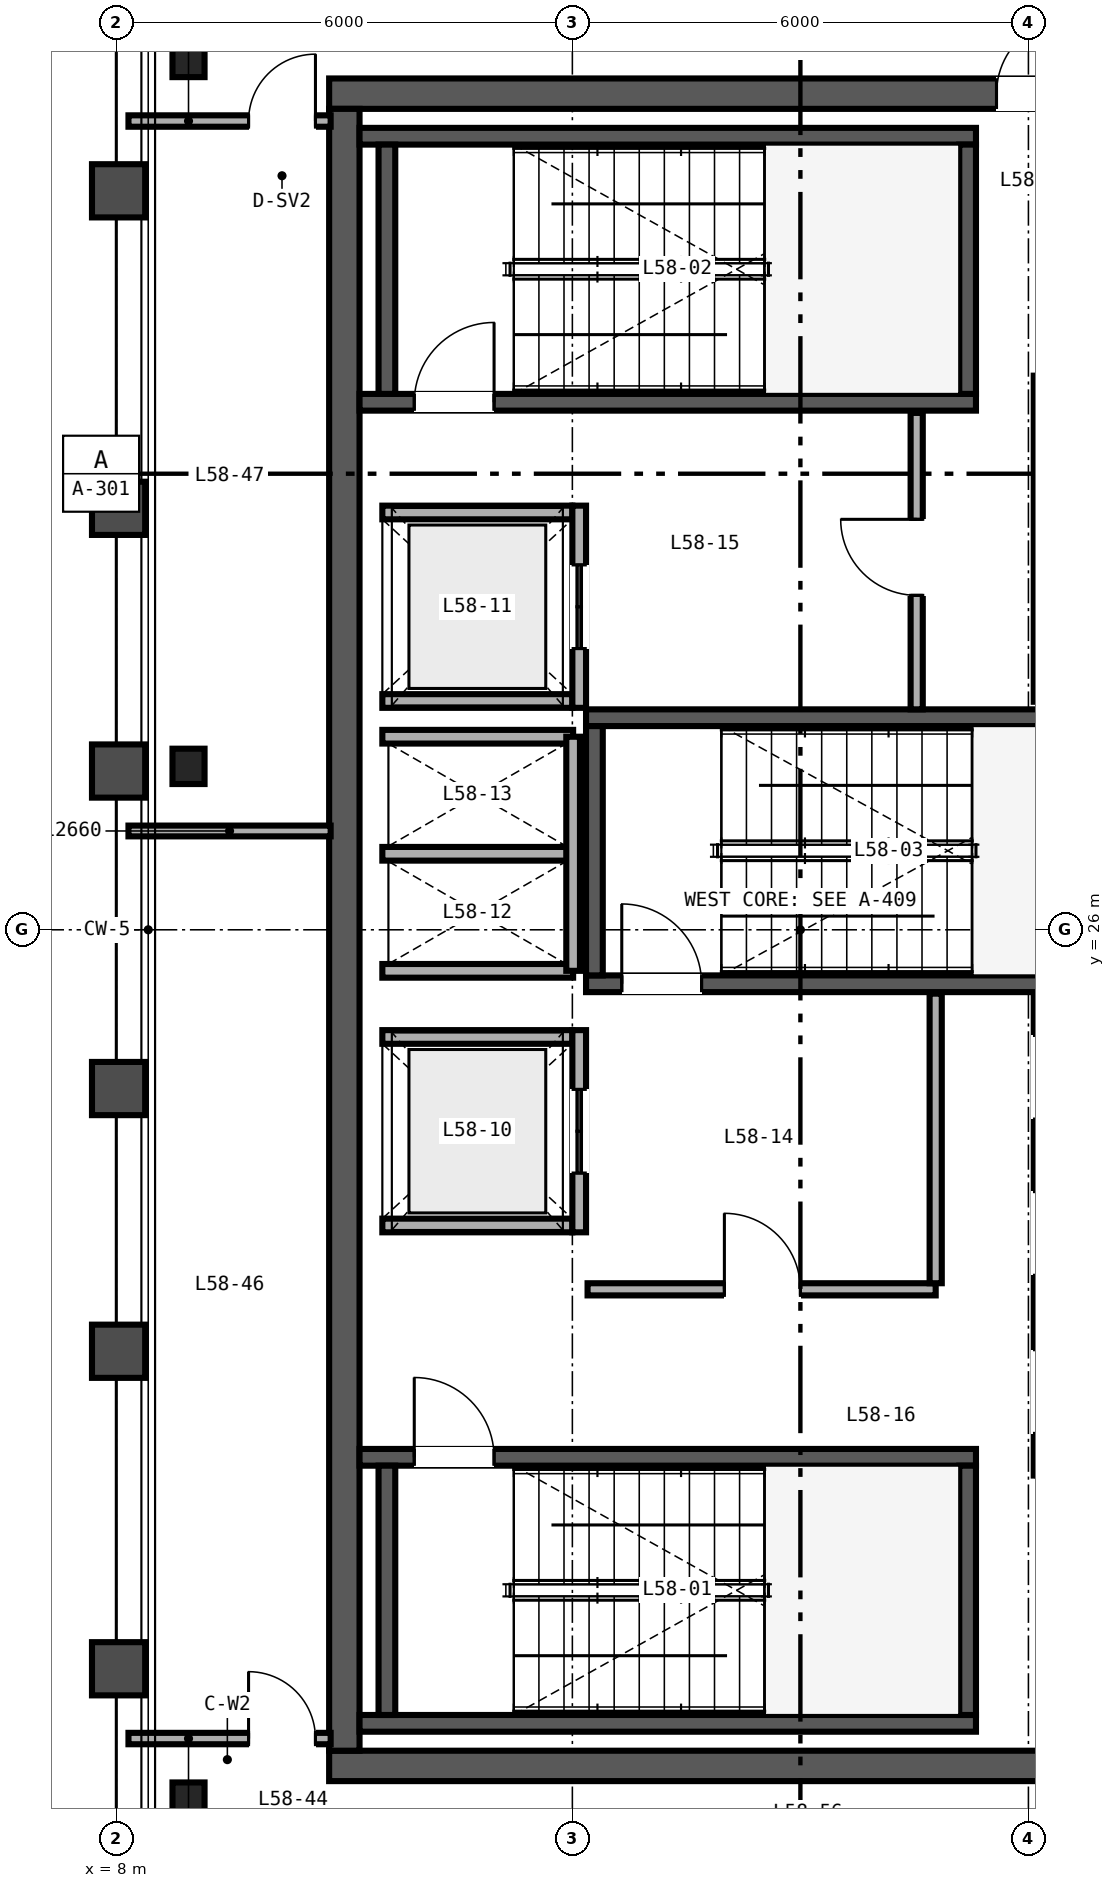
"""IFC4 building model, lengths in metres.
Left out: names, types, materials, properties, quantities, classifications, styles, units other than length and angle.
Written with IfcOpenShell. Run it as: python <this file> out.ifc"""

import sys

from ifc_helpers import new_model, si_unit, direction, frame, frame_2d, origin, origin_2d, place, context, subcontext, project, spatial, rectangle, i_section, extrude, source, transform, mapped, element, fill, save


model = new_model("IFC4")
c1 = context("Model", 3, precision=1e-05, world=origin(), true_north=direction((0.0, 1.0)))
c2 = subcontext(c1, "Body", "Model", "MODEL_VIEW")
j1 = project(units=[si_unit("LENGTHUNIT", "METRE"), si_unit("PLANEANGLEUNIT", "RADIAN")], contexts=[c1])
p1 = place(None, origin())
s1 = spatial("IfcSite", under=j1, at=p1, CompositionType="ELEMENT")
p2 = place(p1, origin())
s2 = spatial("IfcBuilding", under=s1, at=p2, CompositionType="ELEMENT")
p3 = place(p2, frame((0.0, 0.0, 232.8)))
s3 = spatial("IfcBuildingStorey", under=s2, at=p3, CompositionType="ELEMENT", Elevation=232.8)
p4 = place(p3, frame((10.8, 15.0, 0.0), z_axis=(0.0, 0.0, 1.0), x_axis=(1.0, 0.0, 0.0)))
e1 = element("IfcWall", 1, at=p4, inside=s3, PredefinedType="SHEAR", context=c2, shape_type="SweptSolid", body=[
    extrude(rectangle(XDim=12.4, YDim=0.4, at=frame_2d((6.2, 0.0))), origin(), (0.0, 0.0, 1.0), 3.38),
])
p5 = place(p4, frame((10.1, 0.0, 0.0)))
e2 = element("IfcOpeningElement", 2, at=p5, cuts=e1, PredefinedType="OPENING", context=c2, shape_type="SweptSolid", body=[
    extrude(rectangle(XDim=1.0, YDim=2.15, at=frame_2d((0.5, 1.075))), frame((0.0, 0.21, 0.0), z_axis=(0.0, -1.0, 0.0), x_axis=(1.0, 0.0, 0.0)), (0.0, 0.0, 1.0), 0.42),
])
p6 = place(p3, frame((10.8, 37.0, 0.0), z_axis=(0.0, 0.0, 1.0), x_axis=(1.0, 0.0, 0.0)))
e3 = element("IfcWall", 3, at=p6, inside=s3, PredefinedType="SHEAR", context=c2, shape_type="SweptSolid", body=[
    extrude(rectangle(XDim=12.4, YDim=0.4, at=frame_2d((6.2, 0.0))), origin(), (0.0, 0.0, 1.0), 3.38),
])
p7 = place(p6, frame((8.78, 0.0, 0.0)))
e4 = element("IfcOpeningElement", 4, at=p7, cuts=e3, PredefinedType="OPENING", context=c2, shape_type="SweptSolid", body=[
    extrude(rectangle(XDim=1.0, YDim=2.15, at=frame_2d((0.5, 1.075))), frame((0.0, 0.21, 0.0), z_axis=(0.0, -1.0, 0.0), x_axis=(1.0, 0.0, 0.0)), (0.0, 0.0, 1.0), 0.42),
])
p8 = place(p3, frame((11.0, 15.2, 0.0), z_axis=(0.0, 0.0, 1.0), x_axis=(0.0, 1.0, 0.0)))
e5 = element("IfcWall", 5, at=p8, inside=s3, PredefinedType="SHEAR", context=c2, shape_type="SweptSolid", body=[
    extrude(rectangle(XDim=21.6, YDim=0.4, at=frame_2d((10.8, 0.0))), origin(), (0.0, 0.0, 1.0), 3.38),
])
p9 = place(p3, frame((11.2, 15.56, 0.0), z_axis=(0.0, 0.0, 1.0), x_axis=(1.0, 0.0, 0.0)))
e6 = element("IfcWall", 6, at=p9, inside=s3, PredefinedType="SHEAR", context=c2, shape_type="SweptSolid", body=[
    extrude(rectangle(XDim=8.11, YDim=0.22, at=frame_2d((4.055, 0.0))), origin(), (0.0, 0.0, 1.0), 3.4),
])
p10 = place(p3, frame((11.2, 19.06, 0.0), z_axis=(0.0, 0.0, 1.0), x_axis=(1.0, 0.0, 0.0)))
e7 = element("IfcWall", 7, at=p10, inside=s3, PredefinedType="SHEAR", context=c2, shape_type="SweptSolid", body=[
    extrude(rectangle(XDim=8.11, YDim=0.22, at=frame_2d((4.055, 0.0))), origin(), (0.0, 0.0, 1.0), 3.4),
])
p11 = place(p10, frame((0.72, 0.0, 0.0)))
e8 = element("IfcOpeningElement", 8, at=p11, cuts=e7, PredefinedType="OPENING", context=c2, shape_type="SweptSolid", body=[
    extrude(rectangle(XDim=1.05, YDim=2.15, at=frame_2d((0.525, 1.075))), frame((0.0, 0.12, 0.0), z_axis=(0.0, -1.0, 0.0), x_axis=(1.0, 0.0, 0.0)), (0.0, 0.0, 1.0), 0.24),
])
for number, where, z_axis, x_axis in (
    (9, (11.56, 15.67, 0.0), (0.0, 0.0, 1.0), (0.0, 1.0, 0.0)),
    (10, (19.2, 15.67, 0.0), (0.0, 0.0, 1.0), (0.0, 1.0, 0.0)),
):
    element("IfcWall", number, at=place(p3, frame(where, z_axis=z_axis, x_axis=x_axis)), inside=s3, PredefinedType="SHEAR", context=c2, shape_type="SweptSolid", body=[
        extrude(rectangle(XDim=3.28, YDim=0.22, at=frame_2d((1.64, 0.0))), origin(), (0.0, 0.0, 1.0), 3.4),
    ])
p12 = place(p3, frame((11.2, 32.94, 0.0), z_axis=(0.0, 0.0, 1.0), x_axis=(1.0, 0.0, 0.0)))
e11 = element("IfcWall", 11, at=p12, inside=s3, PredefinedType="SHEAR", context=c2, shape_type="SweptSolid", body=[
    extrude(rectangle(XDim=8.11, YDim=0.22, at=frame_2d((4.055, 0.0))), origin(), (0.0, 0.0, 1.0), 3.4),
])
p13 = place(p12, frame((0.72, 0.0, 0.0)))
e12 = element("IfcOpeningElement", 12, at=p13, cuts=e11, PredefinedType="OPENING", context=c2, shape_type="SweptSolid", body=[
    extrude(rectangle(XDim=1.05, YDim=2.15, at=frame_2d((0.525, 1.075))), frame((0.0, 0.12, 0.0), z_axis=(0.0, -1.0, 0.0), x_axis=(1.0, 0.0, 0.0)), (0.0, 0.0, 1.0), 0.24),
])
p14 = place(p3, frame((11.2, 36.44, 0.0), z_axis=(0.0, 0.0, 1.0), x_axis=(1.0, 0.0, 0.0)))
e13 = element("IfcWall", 13, at=p14, inside=s3, PredefinedType="SHEAR", context=c2, shape_type="SweptSolid", body=[
    extrude(rectangle(XDim=8.11, YDim=0.22, at=frame_2d((4.055, 0.0))), origin(), (0.0, 0.0, 1.0), 3.4),
])
for number, where, z_axis, x_axis in (
    (14, (11.56, 33.05, 0.0), (0.0, 0.0, 1.0), (0.0, 1.0, 0.0)),
    (15, (19.2, 33.05, 0.0), (0.0, 0.0, 1.0), (0.0, 1.0, 0.0)),
):
    element("IfcWall", number, at=place(p3, frame(where, z_axis=z_axis, x_axis=x_axis)), inside=s3, PredefinedType="SHEAR", context=c2, shape_type="SweptSolid", body=[
        extrude(rectangle(XDim=3.28, YDim=0.22, at=frame_2d((1.64, 0.0))), origin(), (0.0, 0.0, 1.0), 3.4),
    ])
p15 = place(p3, frame((14.18, 25.29, 0.0), z_axis=(0.0, 0.0, 1.0), x_axis=(1.0, 0.0, 0.0)))
e16 = element("IfcWall", 16, at=p15, inside=s3, PredefinedType="SHEAR", context=c2, shape_type="SweptSolid", body=[
    extrude(rectangle(XDim=8.62, YDim=0.22, at=frame_2d((4.31, 0.0))), origin(), (0.0, 0.0, 1.0), 3.4),
])
p16 = place(p15, frame((0.47, 0.0, 0.0)))
e17 = element("IfcOpeningElement", 17, at=p16, cuts=e16, PredefinedType="OPENING", context=c2, shape_type="SweptSolid", body=[
    extrude(rectangle(XDim=1.05, YDim=2.15, at=frame_2d((0.525, 1.075))), frame((0.0, 0.12, 0.0), z_axis=(0.0, -1.0, 0.0), x_axis=(1.0, 0.0, 0.0)), (0.0, 0.0, 1.0), 0.24),
])
p17 = place(p3, frame((14.18, 28.79, 0.0), z_axis=(0.0, 0.0, 1.0), x_axis=(1.0, 0.0, 0.0)))
e18 = element("IfcWall", 18, at=p17, inside=s3, PredefinedType="SHEAR", context=c2, shape_type="SweptSolid", body=[
    extrude(rectangle(XDim=8.62, YDim=0.22, at=frame_2d((4.31, 0.0))), origin(), (0.0, 0.0, 1.0), 3.4),
])
p18 = place(p3, frame((14.29, 25.4, 0.0), z_axis=(0.0, 0.0, 1.0), x_axis=(0.0, 1.0, 0.0)))
e19 = element("IfcWall", 19, at=p18, inside=s3, PredefinedType="SHEAR", context=c2, shape_type="SweptSolid", body=[
    extrude(rectangle(XDim=3.28, YDim=0.22, at=frame_2d((1.64, 0.0))), origin(), (0.0, 0.0, 1.0), 3.4),
])
m1 = source(origin(), c2, "Body", "SweptSolid", [
    extrude(i_section(OverallWidth=0.422, OverallDepth=0.465, WebThickness=0.045, FlangeThickness=0.073, FilletRadius=0.025, at=origin_2d()), origin(), (0.0, 0.0, 1.0), 3.38),
])
for number, where, z_axis, x_axis in (
    (20, (8.95, 14.55, 0.0), (0.0, 0.0, 1.0), (1.0, 0.0, 0.0)),
    (21, (8.95, 28.15, 0.0), (0.0, 0.0, 1.0), (1.0, 0.0, 0.0)),
    (22, (8.95, 37.45, 0.0), (0.0, 0.0, 1.0), (1.0, 0.0, 0.0)),
):
    element("IfcColumn", number, at=place(p3, frame(where, z_axis=z_axis, x_axis=x_axis)), inside=s3, PredefinedType="COLUMN", context=c2, shape_type="MappedRepresentation", body=[
        mapped(m1, transform((0.0, 0.0, 0.0), scale=1.0)),
    ])
p19 = place(p3, frame((20.16, 18.82, 0.0), z_axis=(0.0, 0.0, 1.0), x_axis=(0.0, 1.0, 0.0)))
e23 = element("IfcWall", 23, at=p19, inside=s3, PredefinedType="SOLIDWALL", context=c2, shape_type="SweptSolid", body=[
    extrude(rectangle(XDim=6.32, YDim=0.18, at=frame_2d((3.16, 0.0))), origin(), (0.0, 0.0, 1.0), 2.48),
])
p20 = place(p19, frame((0.555, 0.0, 0.0)))
e24 = element("IfcOpeningElement", 24, at=p20, cuts=e23, PredefinedType="OPENING", context=c2, shape_type="SweptSolid", body=[
    extrude(rectangle(XDim=1.1, YDim=2.2, at=frame_2d((0.55, 1.1))), frame((0.0, 0.1, 0.0), z_axis=(0.0, -1.0, 0.0), x_axis=(1.0, 0.0, 0.0)), (0.0, 0.0, 1.0), 0.2),
])
p21 = place(p19, frame((2.635, 0.0, 0.0)))
e25 = element("IfcOpeningElement", 25, at=p21, cuts=e23, PredefinedType="OPENING", context=c2, shape_type="SweptSolid", body=[
    extrude(rectangle(XDim=1.1, YDim=2.2, at=frame_2d((0.55, 1.1))), frame((0.0, 0.1, 0.0), z_axis=(0.0, -1.0, 0.0), x_axis=(1.0, 0.0, 0.0)), (0.0, 0.0, 1.0), 0.2),
])
p22 = place(p19, frame((4.69, 0.0, 0.0)))
e26 = element("IfcOpeningElement", 26, at=p22, cuts=e23, PredefinedType="OPENING", context=c2, shape_type="SweptSolid", body=[
    extrude(rectangle(XDim=1.1, YDim=2.2, at=frame_2d((0.55, 1.1))), frame((0.0, 0.1, 0.0), z_axis=(0.0, -1.0, 0.0), x_axis=(1.0, 0.0, 0.0)), (0.0, 0.0, 1.0), 0.2),
])
p23 = place(p3, frame((20.16, 29.0, 0.0), z_axis=(0.0, 0.0, 1.0), x_axis=(0.0, 1.0, 0.0)))
e27 = element("IfcWall", 27, at=p23, inside=s3, PredefinedType="SOLIDWALL", context=c2, shape_type="SweptSolid", body=[
    extrude(rectangle(XDim=4.29, YDim=0.18, at=frame_2d((2.145, 0.0))), origin(), (0.0, 0.0, 1.0), 3.38),
])
for number, where, z_axis, x_axis in (
    (28, (11.5, 22.11, 0.0), (0.0, 0.0, 1.0), (1.0, 0.0, 0.0)),
    (29, (11.5, 24.59, 0.0), (0.0, 0.0, 1.0), (1.0, 0.0, 0.0)),
):
    element("IfcWall", number, at=place(p3, frame(where, z_axis=z_axis, x_axis=x_axis)), inside=s3, PredefinedType="SOLIDWALL", context=c2, shape_type="SweptSolid", body=[
        extrude(rectangle(XDim=2.5, YDim=0.18, at=frame_2d((1.25, 0.0))), origin(), (0.0, 0.0, 1.0), 3.38),
    ])
p24 = place(p3, frame((14.09, 22.02, 0.0), z_axis=(0.0, 0.0, 1.0), x_axis=(0.0, 1.0, 0.0)))
e30 = element("IfcWall", 30, at=p24, inside=s3, PredefinedType="SOLIDWALL", context=c2, shape_type="SweptSolid", body=[
    extrude(rectangle(XDim=2.66, YDim=0.18, at=frame_2d((1.33, 0.0))), origin(), (0.0, 0.0, 1.0), 3.38),
])
p25 = place(p24, frame((0.78, 0.0, 0.0)))
e31 = element("IfcOpeningElement", 31, at=p25, cuts=e30, PredefinedType="OPENING", context=c2, shape_type="SweptSolid", body=[
    extrude(rectangle(XDim=1.1, YDim=2.2, at=frame_2d((0.55, 1.1))), frame((0.0, 0.1, 0.0), z_axis=(0.0, -1.0, 0.0), x_axis=(1.0, 0.0, 0.0)), (0.0, 0.0, 1.0), 0.2),
])
for number, where, z_axis, x_axis in (
    (32, (11.5, 29.01, 0.0), (0.0, 0.0, 1.0), (1.0, 0.0, 0.0)),
    (33, (11.5, 31.49, 0.0), (0.0, 0.0, 1.0), (1.0, 0.0, 0.0)),
):
    element("IfcWall", number, at=place(p3, frame(where, z_axis=z_axis, x_axis=x_axis)), inside=s3, PredefinedType="SOLIDWALL", context=c2, shape_type="SweptSolid", body=[
        extrude(rectangle(XDim=2.5, YDim=0.18, at=frame_2d((1.25, 0.0))), origin(), (0.0, 0.0, 1.0), 3.38),
    ])
p26 = place(p3, frame((14.09, 28.92, 0.0), z_axis=(0.0, 0.0, 1.0), x_axis=(0.0, 1.0, 0.0)))
e34 = element("IfcWall", 34, at=p26, inside=s3, PredefinedType="SOLIDWALL", context=c2, shape_type="SweptSolid", body=[
    extrude(rectangle(XDim=2.66, YDim=0.18, at=frame_2d((1.33, 0.0))), origin(), (0.0, 0.0, 1.0), 3.38),
])
p27 = place(p26, frame((0.78, 0.0, 0.0)))
e35 = element("IfcOpeningElement", 35, at=p27, cuts=e34, PredefinedType="OPENING", context=c2, shape_type="SweptSolid", body=[
    extrude(rectangle(XDim=1.1, YDim=2.2, at=frame_2d((0.55, 1.1))), frame((0.0, 0.1, 0.0), z_axis=(0.0, -1.0, 0.0), x_axis=(1.0, 0.0, 0.0)), (0.0, 0.0, 1.0), 0.2),
])
for number, where, z_axis, x_axis in (
    (36, (11.5, 25.46, 0.0), (0.0, 0.0, 1.0), (1.0, 0.0, 0.0)),
    (37, (11.5, 27.0, 0.0), (0.0, 0.0, 1.0), (1.0, 0.0, 0.0)),
    (38, (11.5, 28.54, 0.0), (0.0, 0.0, 1.0), (1.0, 0.0, 0.0)),
):
    element("IfcWall", number, at=place(p3, frame(where, z_axis=z_axis, x_axis=x_axis)), inside=s3, PredefinedType="SOLIDWALL", context=c2, shape_type="SweptSolid", body=[
        extrude(rectangle(XDim=2.51, YDim=0.18, at=frame_2d((1.255, 0.0))), origin(), (0.0, 0.0, 1.0), 3.38),
    ])
p28 = place(p3, frame((14.01, 25.46, 0.0), z_axis=(0.0, 0.0, 1.0), x_axis=(0.0, 1.0, 0.0)))
e39 = element("IfcWall", 39, at=p28, inside=s3, PredefinedType="SOLIDWALL", context=c2, shape_type="SweptSolid", body=[
    extrude(rectangle(XDim=3.08, YDim=0.18, at=frame_2d((1.54, 0.0))), origin(), (0.0, 0.0, 1.0), 3.38),
])
p29 = place(p3, frame((14.2, 21.27, 0.0), z_axis=(0.0, 0.0, 1.0), x_axis=(1.0, 0.0, 0.0)))
e40 = element("IfcWall", 40, at=p29, inside=s3, PredefinedType="PARTITIONING", context=c2, shape_type="SweptSolid", body=[
    extrude(rectangle(XDim=4.58, YDim=0.16, at=frame_2d((2.29, 0.0))), origin(), (0.0, 0.0, 1.0), 3.38),
])
p30 = place(p29, frame((1.8, 0.0, 0.0)))
e41 = element("IfcOpeningElement", 41, at=p30, cuts=e40, PredefinedType="OPENING", context=c2, shape_type="SweptSolid", body=[
    extrude(rectangle(XDim=1.0, YDim=2.15, at=frame_2d((0.5, 1.075))), frame((0.0, 0.09, 0.0), z_axis=(0.0, -1.0, 0.0), x_axis=(1.0, 0.0, 0.0)), (0.0, 0.0, 1.0), 0.18),
])
p31 = place(p3, frame((18.78, 21.35, 0.0), z_axis=(0.0, 0.0, 1.0), x_axis=(0.0, 1.0, 0.0)))
e42 = element("IfcWall", 42, at=p31, inside=s3, PredefinedType="PARTITIONING", context=c2, shape_type="SweptSolid", body=[
    extrude(rectangle(XDim=3.81, YDim=0.16, at=frame_2d((1.905, 0.0))), origin(), (0.0, 0.0, 1.0), 3.38),
])
p32 = place(p3, frame((18.53, 28.9, 0.0), z_axis=(0.0, 0.0, 1.0), x_axis=(0.0, 1.0, 0.0)))
e43 = element("IfcWall", 43, at=p32, inside=s3, PredefinedType="PARTITIONING", context=c2, shape_type="SweptSolid", body=[
    extrude(rectangle(XDim=3.9, YDim=0.16, at=frame_2d((1.95, 0.0))), origin(), (0.0, 0.0, 1.0), 3.38),
])
p33 = place(p32, frame((1.5, 0.0, 0.0)))
e44 = element("IfcOpeningElement", 44, at=p33, cuts=e43, PredefinedType="OPENING", context=c2, shape_type="SweptSolid", body=[
    extrude(rectangle(XDim=1.0, YDim=2.15, at=frame_2d((0.5, 1.075))), frame((0.0, 0.09, 0.0), z_axis=(0.0, -1.0, 0.0), x_axis=(1.0, 0.0, 0.0)), (0.0, 0.0, 1.0), 0.18),
])
p34 = place(p3, frame((8.16, 15.36, 0.0), z_axis=(0.0, 0.0, 1.0), x_axis=(1.0, 0.0, 0.0)))
e45 = element("IfcWall", 45, at=p34, inside=s3, PredefinedType="PARTITIONING", context=c2, shape_type="SweptSolid", body=[
    extrude(rectangle(XDim=2.66, YDim=0.15, at=frame_2d((1.33, 0.0))), origin(), (0.0, 0.0, 1.0), 2.601),
])
p35 = place(p34, frame((1.58, 0.0, 0.0)))
e46 = element("IfcOpeningElement", 46, at=p35, cuts=e45, PredefinedType="OPENING", context=c2, shape_type="SweptSolid", body=[
    extrude(rectangle(XDim=0.88, YDim=2.15, at=frame_2d((0.44, 1.075))), frame((0.0, 0.085, 0.0), z_axis=(0.0, -1.0, 0.0), x_axis=(1.0, 0.0, 0.0)), (0.0, 0.0, 1.0), 0.17),
])
p36 = place(p3, frame((8.16, 36.64, 0.0), z_axis=(0.0, 0.0, 1.0), x_axis=(1.0, 0.0, 0.0)))
e47 = element("IfcWall", 47, at=p36, inside=s3, PredefinedType="PARTITIONING", context=c2, shape_type="SweptSolid", body=[
    extrude(rectangle(XDim=2.66, YDim=0.15, at=frame_2d((1.33, 0.0))), origin(), (0.0, 0.0, 1.0), 2.763),
])
p37 = place(p36, frame((1.58, 0.0, 0.0)))
e48 = element("IfcOpeningElement", 48, at=p37, cuts=e47, PredefinedType="OPENING", context=c2, shape_type="SweptSolid", body=[
    extrude(rectangle(XDim=0.88, YDim=2.15, at=frame_2d((0.44, 1.075))), frame((0.0, 0.085, 0.0), z_axis=(0.0, -1.0, 0.0), x_axis=(1.0, 0.0, 0.0)), (0.0, 0.0, 1.0), 0.17),
])
p38 = place(p3, frame((8.16, 27.3, 0.0), z_axis=(0.0, 0.0, 1.0), x_axis=(1.0, 0.0, 0.0)))
e49 = element("IfcWall", 49, at=p38, inside=s3, PredefinedType="PARTITIONING", context=c2, shape_type="SweptSolid", body=[
    extrude(rectangle(XDim=2.66, YDim=0.142, at=frame_2d((1.33, 0.0))), origin(), (0.0, 0.0, 1.0), 2.601),
])
m2 = source(origin(), c2, "Body", "SweptSolid", [
    extrude(rectangle(XDim=1.05, YDim=2.15, at=frame_2d((0.525, 1.075))), frame((0.0, 0.025, 0.0), z_axis=(0.0, -1.0, 0.0), x_axis=(1.0, 0.0, 0.0)), (0.0, 0.0, 1.0), 0.05),
])
p39 = place(p11, origin())
e50 = element("IfcDoor", 50, at=p39, inside=s3, OperationType="SINGLE_SWING_LEFT", PredefinedType="DOOR", context=c2, shape_type="MappedRepresentation", body=[
    mapped(m2, transform((0.0, 0.0, 0.0), scale=1.0)),
])
fill(e8, e50)
p40 = place(p13, origin())
e51 = element("IfcDoor", 51, at=p40, inside=s3, OperationType="SINGLE_SWING_RIGHT", PredefinedType="DOOR", context=c2, shape_type="MappedRepresentation", body=[
    mapped(m2, transform((0.0, 0.0, 0.0), scale=1.0)),
])
fill(e12, e51)
p41 = place(p16, origin())
e52 = element("IfcDoor", 52, at=p41, inside=s3, OperationType="SINGLE_SWING_LEFT", PredefinedType="DOOR", context=c2, shape_type="MappedRepresentation", body=[
    mapped(m2, transform((0.0, 0.0, 0.0), scale=1.0)),
])
fill(e17, e52)
m3 = source(origin(), c2, "Body", "SweptSolid", [
    extrude(rectangle(XDim=1.1, YDim=2.2, at=frame_2d((0.55, 1.1))), frame((0.0, 0.025, 0.0), z_axis=(0.0, -1.0, 0.0), x_axis=(1.0, 0.0, 0.0)), (0.0, 0.0, 1.0), 0.05),
])
p42 = place(p25, origin())
e53 = element("IfcDoor", 53, at=p42, inside=s3, OperationType="DOUBLE_DOOR_SLIDING", PredefinedType="DOOR", context=c2, shape_type="MappedRepresentation", body=[
    mapped(m3, transform((0.0, 0.0, 0.0), scale=1.0)),
])
fill(e31, e53)
p43 = place(p27, origin())
e54 = element("IfcDoor", 54, at=p43, inside=s3, OperationType="DOUBLE_DOOR_SLIDING", PredefinedType="DOOR", context=c2, shape_type="MappedRepresentation", body=[
    mapped(m3, transform((0.0, 0.0, 0.0), scale=1.0)),
])
fill(e35, e54)
m4 = source(origin(), c2, "Body", "SweptSolid", [
    extrude(rectangle(XDim=1.0, YDim=2.15, at=frame_2d((0.5, 1.075))), frame((0.0, 0.025, 0.0), z_axis=(0.0, -1.0, 0.0), x_axis=(1.0, 0.0, 0.0)), (0.0, 0.0, 1.0), 0.05),
])
p44 = place(p30, origin())
e55 = element("IfcDoor", 55, at=p44, inside=s3, OperationType="SINGLE_SWING_LEFT", PredefinedType="DOOR", context=c2, shape_type="MappedRepresentation", body=[
    mapped(m4, transform((0.0, 0.0, 0.0), scale=1.0)),
])
fill(e41, e55)
p45 = place(p33, origin())
e56 = element("IfcDoor", 56, at=p45, inside=s3, OperationType="SINGLE_SWING_RIGHT", PredefinedType="DOOR", context=c2, shape_type="MappedRepresentation", body=[
    mapped(m4, transform((0.0, 0.0, 0.0), scale=1.0)),
])
fill(e44, e56)
p46 = place(p7, origin())
e57 = element("IfcDoor", 57, at=p46, inside=s3, OperationType="SINGLE_SWING_RIGHT", PredefinedType="DOOR", context=c2, shape_type="MappedRepresentation", body=[
    mapped(m4, transform((0.0, 0.0, 0.0), scale=1.0)),
])
fill(e4, e57)
m5 = source(origin(), c2, "Body", "SweptSolid", [
    extrude(rectangle(XDim=0.88, YDim=2.15, at=frame_2d((0.44, 1.075))), frame((0.0, 0.025, 0.0), z_axis=(0.0, -1.0, 0.0), x_axis=(1.0, 0.0, 0.0)), (0.0, 0.0, 1.0), 0.05),
])
p47 = place(p35, origin())
e58 = element("IfcDoor", 58, at=p47, inside=s3, OperationType="SINGLE_SWING_LEFT", PredefinedType="DOOR", context=c2, shape_type="MappedRepresentation", body=[
    mapped(m5, transform((0.0, 0.0, 0.0), scale=1.0)),
])
fill(e46, e58)
p48 = place(p37, origin())
e59 = element("IfcDoor", 59, at=p48, inside=s3, OperationType="SINGLE_SWING_RIGHT", PredefinedType="DOOR", context=c2, shape_type="MappedRepresentation", body=[
    mapped(m5, transform((0.0, 0.0, 0.0), scale=1.0)),
])
fill(e48, e59)
save(model, sys.argv[1])
